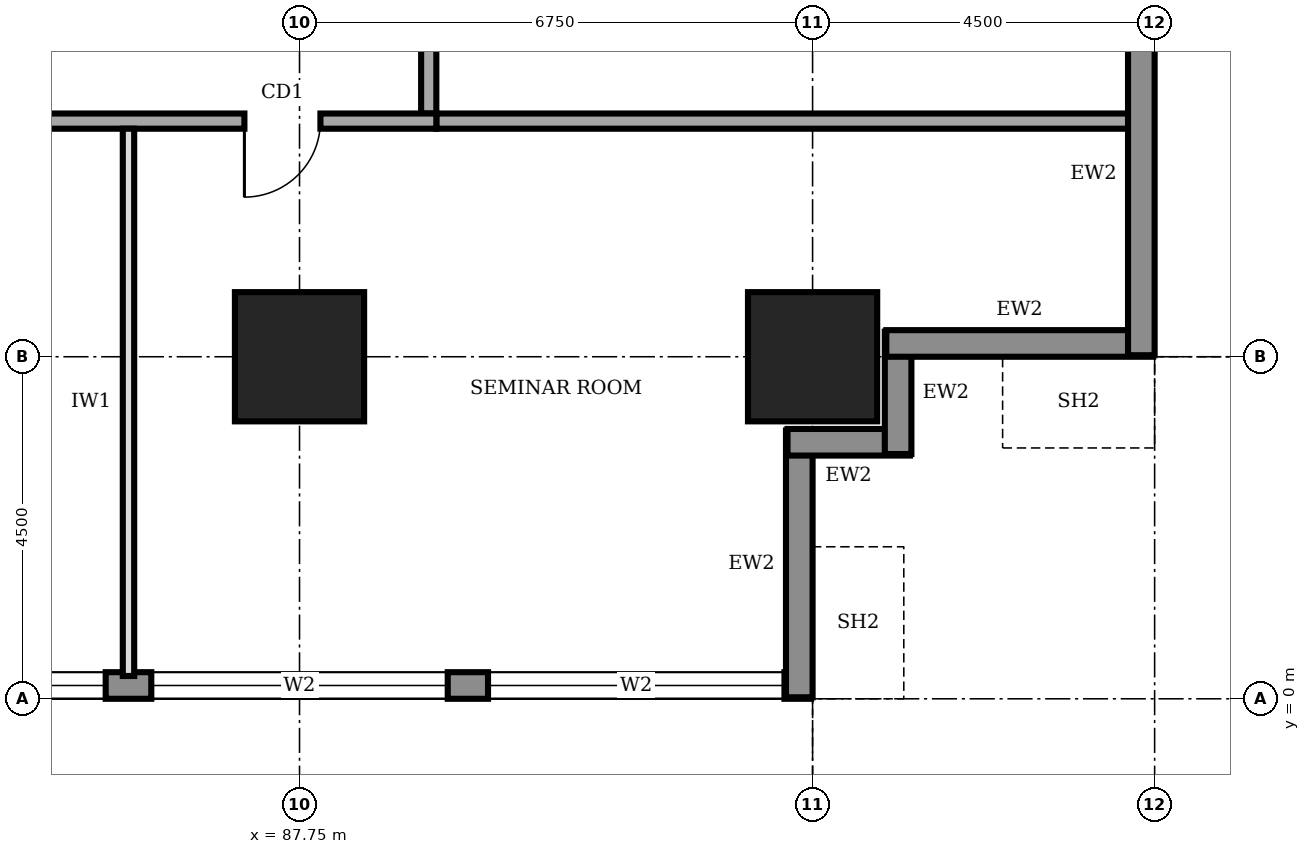
"""IFC4 building model, lengths in metres.
Left out: names, types, materials, properties, quantities, classifications, styles, units other than length and angle.
Written with IfcOpenShell. Run it as: python <this file> out.ifc"""

import sys

from ifc_helpers import new_model, si_unit, direction, frame, frame_2d, origin, origin_2d, place, context, subcontext, project, spatial, rectangle, extrude, element, fill, save


model = new_model("IFC4")
c1 = context("Model", 3, precision=1e-05, world=origin(), true_north=direction((0.0, 1.0)))
c2 = subcontext(c1, "Body", "Model", "MODEL_VIEW")
j1 = project(units=[si_unit("LENGTHUNIT", "METRE"), si_unit("PLANEANGLEUNIT", "RADIAN")], contexts=[c1])
p1 = place(None, origin())
s1 = spatial("IfcSite", under=j1, at=p1, CompositionType="ELEMENT")
p2 = place(p1, origin())
s2 = spatial("IfcBuilding", under=s1, at=p2, CompositionType="ELEMENT")
p3 = place(p2, frame((0.0, 0.0, 61.0)))
s3 = spatial("IfcBuildingStorey", under=s2, at=p3, CompositionType="ELEMENT", Elevation=61.0)
for number, where, z_axis, x_axis in (
    (1, (87.75, 4.5, 0.0), (0.0, 0.0, 1.0), (1.0, 0.0, 0.0)),
    (2, (94.5, 4.5, 0.0), (0.0, 0.0, 1.0), (1.0, 0.0, 0.0)),
):
    element("IfcColumn", number, at=place(p3, frame(where, z_axis=z_axis, x_axis=x_axis)), inside=s3, PredefinedType="COLUMN", context=c2, shape_type="SweptSolid", body=[
        extrude(rectangle(XDim=1.7, YDim=1.7, at=origin_2d()), origin(), (0.0, 0.0, 1.0), 4.0),
    ])
p4 = place(p3, frame((67.52, 0.175, 0.0), z_axis=(0.0, 0.0, 1.0), x_axis=(1.0, 0.0, 0.0)))
e3 = element("IfcWall", 3, at=p4, inside=s3, PredefinedType="STANDARD", context=c2, shape_type="SweptSolid", body=[
    extrude(rectangle(XDim=26.96, YDim=0.35, at=frame_2d((13.48, 0.0))), origin(), (0.0, 0.0, 1.0), 3.75),
])
p5 = place(p4, frame((4.78, 0.0, 0.6)))
e4 = element("IfcOpeningElement", 4, at=p5, cuts=e3, PredefinedType="OPENING", context=c2, shape_type="SweptSolid", body=[
    extrude(rectangle(XDim=3.9, YDim=2.6, at=frame_2d((1.95, 1.3))), frame((0.0, 0.185, 0.0), z_axis=(0.0, -1.0, 0.0), x_axis=(1.0, 0.0, 0.0)), (0.0, 0.0, 1.0), 0.37),
])
p6 = place(p4, frame((9.28, 0.0, 0.6)))
e5 = element("IfcOpeningElement", 5, at=p6, cuts=e3, PredefinedType="OPENING", context=c2, shape_type="SweptSolid", body=[
    extrude(rectangle(XDim=3.9, YDim=2.6, at=frame_2d((1.95, 1.3))), frame((0.0, 0.185, 0.0), z_axis=(0.0, -1.0, 0.0), x_axis=(1.0, 0.0, 0.0)), (0.0, 0.0, 1.0), 0.37),
])
p7 = place(p4, frame((13.78, 0.0, 0.6)))
e6 = element("IfcOpeningElement", 6, at=p7, cuts=e3, PredefinedType="OPENING", context=c2, shape_type="SweptSolid", body=[
    extrude(rectangle(XDim=3.9, YDim=2.6, at=frame_2d((1.95, 1.3))), frame((0.0, 0.185, 0.0), z_axis=(0.0, -1.0, 0.0), x_axis=(1.0, 0.0, 0.0)), (0.0, 0.0, 1.0), 0.37),
])
p8 = place(p4, frame((18.28, 0.0, 0.6)))
e7 = element("IfcOpeningElement", 7, at=p8, cuts=e3, PredefinedType="OPENING", context=c2, shape_type="SweptSolid", body=[
    extrude(rectangle(XDim=3.9, YDim=2.6, at=frame_2d((1.95, 1.3))), frame((0.0, 0.185, 0.0), z_axis=(0.0, -1.0, 0.0), x_axis=(1.0, 0.0, 0.0)), (0.0, 0.0, 1.0), 0.37),
])
p9 = place(p4, frame((22.71, 0.0, 0.6)))
e8 = element("IfcOpeningElement", 8, at=p9, cuts=e3, PredefinedType="OPENING", context=c2, shape_type="SweptSolid", body=[
    extrude(rectangle(XDim=3.9, YDim=2.6, at=frame_2d((1.95, 1.3))), frame((0.0, 0.185, 0.0), z_axis=(0.0, -1.0, 0.0), x_axis=(1.0, 0.0, 0.0)), (0.0, 0.0, 1.0), 0.37),
])
p10 = place(p3, frame((94.325, 0.02, 0.0), z_axis=(0.0, 0.0, 1.0), x_axis=(0.0, 1.0, 0.0)))
e9 = element("IfcWall", 9, at=p10, inside=s3, PredefinedType="STANDARD", context=c2, shape_type="SweptSolid", body=[
    extrude(rectangle(XDim=3.51, YDim=0.35, at=frame_2d((1.755, 0.0))), origin(), (0.0, 0.0, 1.0), 2.85),
])
for number, where, z_axis, x_axis in (
    (10, (94.17, 3.375, 0.0), (0.0, 0.0, 1.0), (1.0, 0.0, 0.0)),
    (11, (95.625, 3.22, 0.0), (0.0, 0.0, 1.0), (0.0, 1.0, 0.0)),
):
    element("IfcWall", number, at=place(p3, frame(where, z_axis=z_axis, x_axis=x_axis)), inside=s3, PredefinedType="STANDARD", context=c2, shape_type="SweptSolid", body=[
        extrude(rectangle(XDim=1.61, YDim=0.35, at=frame_2d((0.805, 0.0))), origin(), (0.0, 0.0, 1.0), 3.75),
    ])
p11 = place(p3, frame((95.47, 4.675, 0.0), z_axis=(0.0, 0.0, 1.0), x_axis=(1.0, 0.0, 0.0)))
e12 = element("IfcWall", 12, at=p11, inside=s3, PredefinedType="STANDARD", context=c2, shape_type="SweptSolid", body=[
    extrude(rectangle(XDim=3.51, YDim=0.35, at=frame_2d((1.755, 0.0))), origin(), (0.0, 0.0, 1.0), 2.85),
])
p12 = place(p3, frame((98.825, 4.52, 0.0), z_axis=(0.0, 0.0, 1.0), x_axis=(0.0, 1.0, 0.0)))
e13 = element("IfcWall", 13, at=p12, inside=s3, PredefinedType="STANDARD", context=c2, shape_type="SweptSolid", body=[
    extrude(rectangle(XDim=31.46, YDim=0.35, at=frame_2d((15.73, 0.0))), origin(), (0.0, 0.0, 1.0), 3.75),
])
p13 = place(p12, frame((4.78, 0.0, 0.6)))
e14 = element("IfcOpeningElement", 14, at=p13, cuts=e13, PredefinedType="OPENING", context=c2, shape_type="SweptSolid", body=[
    extrude(rectangle(XDim=3.9, YDim=2.6, at=frame_2d((1.95, 1.3))), frame((0.0, 0.185, 0.0), z_axis=(0.0, -1.0, 0.0), x_axis=(1.0, 0.0, 0.0)), (0.0, 0.0, 1.0), 0.37),
])
p14 = place(p12, frame((9.28, 0.0, 0.6)))
e15 = element("IfcOpeningElement", 15, at=p14, cuts=e13, PredefinedType="OPENING", context=c2, shape_type="SweptSolid", body=[
    extrude(rectangle(XDim=3.9, YDim=2.6, at=frame_2d((1.95, 1.3))), frame((0.0, 0.185, 0.0), z_axis=(0.0, -1.0, 0.0), x_axis=(1.0, 0.0, 0.0)), (0.0, 0.0, 1.0), 0.37),
])
p15 = place(p12, frame((13.78, 0.0, 0.6)))
e16 = element("IfcOpeningElement", 16, at=p15, cuts=e13, PredefinedType="OPENING", context=c2, shape_type="SweptSolid", body=[
    extrude(rectangle(XDim=3.9, YDim=2.6, at=frame_2d((1.95, 1.3))), frame((0.0, 0.185, 0.0), z_axis=(0.0, -1.0, 0.0), x_axis=(1.0, 0.0, 0.0)), (0.0, 0.0, 1.0), 0.37),
])
p16 = place(p12, frame((18.28, 0.0, 0.6)))
e17 = element("IfcOpeningElement", 17, at=p16, cuts=e13, PredefinedType="OPENING", context=c2, shape_type="SweptSolid", body=[
    extrude(rectangle(XDim=3.9, YDim=2.6, at=frame_2d((1.95, 1.3))), frame((0.0, 0.185, 0.0), z_axis=(0.0, -1.0, 0.0), x_axis=(1.0, 0.0, 0.0)), (0.0, 0.0, 1.0), 0.37),
])
p17 = place(p12, frame((22.78, 0.0, 0.6)))
e18 = element("IfcOpeningElement", 18, at=p17, cuts=e13, PredefinedType="OPENING", context=c2, shape_type="SweptSolid", body=[
    extrude(rectangle(XDim=3.9, YDim=2.6, at=frame_2d((1.95, 1.3))), frame((0.0, 0.185, 0.0), z_axis=(0.0, -1.0, 0.0), x_axis=(1.0, 0.0, 0.0)), (0.0, 0.0, 1.0), 0.37),
])
p18 = place(p12, frame((27.21, 0.0, 0.6)))
e19 = element("IfcOpeningElement", 19, at=p18, cuts=e13, PredefinedType="OPENING", context=c2, shape_type="SweptSolid", body=[
    extrude(rectangle(XDim=3.9, YDim=2.6, at=frame_2d((1.95, 1.3))), frame((0.0, 0.185, 0.0), z_axis=(0.0, -1.0, 0.0), x_axis=(1.0, 0.0, 0.0)), (0.0, 0.0, 1.0), 0.37),
])
p19 = place(p3, frame((72.65, 7.6, 0.0), z_axis=(0.0, 0.0, 1.0), x_axis=(1.0, 0.0, 0.0)))
e20 = element("IfcWall", 20, at=p19, inside=s3, PredefinedType="SOLIDWALL", context=c2, shape_type="SweptSolid", body=[
    extrude(rectangle(XDim=16.9, YDim=0.2, at=frame_2d((8.45, 0.0))), origin(), (0.0, 0.0, 1.0), 3.75),
])
p20 = place(p19, frame((3.175, 0.0, 0.0)))
e21 = element("IfcOpeningElement", 21, at=p20, cuts=e20, PredefinedType="OPENING", context=c2, shape_type="SweptSolid", body=[
    extrude(rectangle(XDim=1.8, YDim=2.1, at=frame_2d((0.9, 1.05))), frame((0.0, 0.11, 0.0), z_axis=(0.0, -1.0, 0.0), x_axis=(1.0, 0.0, 0.0)), (0.0, 0.0, 1.0), 0.22),
])
p21 = place(p19, frame((10.1, 0.0, 0.0)))
e22 = element("IfcOpeningElement", 22, at=p21, cuts=e20, PredefinedType="OPENING", context=c2, shape_type="SweptSolid", body=[
    extrude(rectangle(XDim=1.0, YDim=2.1, at=frame_2d((0.5, 1.05))), frame((0.0, 0.11, 0.0), z_axis=(0.0, -1.0, 0.0), x_axis=(1.0, 0.0, 0.0)), (0.0, 0.0, 1.0), 0.22),
])
p22 = place(p19, frame((14.375, 0.0, 0.0)))
e23 = element("IfcOpeningElement", 23, at=p22, cuts=e20, PredefinedType="OPENING", context=c2, shape_type="SweptSolid", body=[
    extrude(rectangle(XDim=1.0, YDim=2.1, at=frame_2d((0.5, 1.05))), frame((0.0, 0.11, 0.0), z_axis=(0.0, -1.0, 0.0), x_axis=(1.0, 0.0, 0.0)), (0.0, 0.0, 1.0), 0.22),
])
p23 = place(p3, frame((89.45, 7.7, 0.0), z_axis=(0.0, 0.0, 1.0), x_axis=(0.0, 1.0, 0.0)))
e24 = element("IfcWall", 24, at=p23, inside=s3, PredefinedType="SOLIDWALL", context=c2, shape_type="SweptSolid", body=[
    extrude(rectangle(XDim=25.3, YDim=0.2, at=frame_2d((12.65, 0.0))), origin(), (0.0, 0.0, 1.0), 3.75),
])
p24 = place(p23, frame((2.3, 0.0, 0.0)))
e25 = element("IfcOpeningElement", 25, at=p24, cuts=e24, PredefinedType="OPENING", context=c2, shape_type="SweptSolid", body=[
    extrude(rectangle(XDim=1.0, YDim=2.1, at=frame_2d((0.5, 1.05))), frame((0.0, 0.11, 0.0), z_axis=(0.0, -1.0, 0.0), x_axis=(1.0, 0.0, 0.0)), (0.0, 0.0, 1.0), 0.22),
])
p25 = place(p23, frame((7.25, 0.0, 0.0)))
e26 = element("IfcOpeningElement", 26, at=p25, cuts=e24, PredefinedType="OPENING", context=c2, shape_type="SweptSolid", body=[
    extrude(rectangle(XDim=0.9, YDim=2.1, at=frame_2d((0.45, 1.05))), frame((0.0, 0.11, 0.0), z_axis=(0.0, -1.0, 0.0), x_axis=(1.0, 0.0, 0.0)), (0.0, 0.0, 1.0), 0.22),
])
p26 = place(p23, frame((10.25, 0.0, 0.0)))
e27 = element("IfcOpeningElement", 27, at=p26, cuts=e24, PredefinedType="OPENING", context=c2, shape_type="SweptSolid", body=[
    extrude(rectangle(XDim=0.9, YDim=2.1, at=frame_2d((0.45, 1.05))), frame((0.0, 0.11, 0.0), z_axis=(0.0, -1.0, 0.0), x_axis=(1.0, 0.0, 0.0)), (0.0, 0.0, 1.0), 0.22),
])
p27 = place(p23, frame((15.1, 0.0, 0.0)))
e28 = element("IfcOpeningElement", 28, at=p27, cuts=e24, PredefinedType="OPENING", context=c2, shape_type="SweptSolid", body=[
    extrude(rectangle(XDim=0.9, YDim=2.1, at=frame_2d((0.45, 1.05))), frame((0.0, 0.11, 0.0), z_axis=(0.0, -1.0, 0.0), x_axis=(1.0, 0.0, 0.0)), (0.0, 0.0, 1.0), 0.22),
])
p28 = place(p23, frame((17.8, 0.0, 0.0)))
e29 = element("IfcOpeningElement", 29, at=p28, cuts=e24, PredefinedType="OPENING", context=c2, shape_type="SweptSolid", body=[
    extrude(rectangle(XDim=1.0, YDim=2.1, at=frame_2d((0.5, 1.05))), frame((0.0, 0.11, 0.0), z_axis=(0.0, -1.0, 0.0), x_axis=(1.0, 0.0, 0.0)), (0.0, 0.0, 1.0), 0.22),
])
p29 = place(p23, frame((12.3, 0.0, 0.0)))
e30 = element("IfcOpeningElement", 30, at=p29, cuts=e24, PredefinedType="OPENING", context=c2, shape_type="SweptSolid", body=[
    extrude(rectangle(XDim=1.0, YDim=2.1, at=frame_2d((0.5, 1.05))), frame((0.0, 0.11, 0.0), z_axis=(0.0, -1.0, 0.0), x_axis=(1.0, 0.0, 0.0)), (0.0, 0.0, 1.0), 0.22),
])
p30 = place(p23, frame((21.8, 0.0, 0.0)))
e31 = element("IfcOpeningElement", 31, at=p30, cuts=e24, PredefinedType="OPENING", context=c2, shape_type="SweptSolid", body=[
    extrude(rectangle(XDim=1.0, YDim=2.1, at=frame_2d((0.5, 1.05))), frame((0.0, 0.11, 0.0), z_axis=(0.0, -1.0, 0.0), x_axis=(1.0, 0.0, 0.0)), (0.0, 0.0, 1.0), 0.22),
])
p31 = place(p3, frame((89.55, 7.6, 0.0), z_axis=(0.0, 0.0, 1.0), x_axis=(1.0, 0.0, 0.0)))
e32 = element("IfcWall", 32, at=p31, inside=s3, PredefinedType="SOLIDWALL", context=c2, shape_type="SweptSolid", body=[
    extrude(rectangle(XDim=9.15, YDim=0.2, at=frame_2d((4.575, 0.0))), origin(), (0.0, 0.0, 1.0), 3.75),
])
p32 = place(p3, frame((85.5, 0.3, 0.0), z_axis=(0.0, 0.0, 1.0), x_axis=(0.0, 1.0, 0.0)))
e33 = element("IfcWall", 33, at=p32, inside=s3, PredefinedType="PARTITIONING", context=c2, shape_type="SweptSolid", body=[
    extrude(rectangle(XDim=7.2, YDim=0.15, at=frame_2d((3.6, 0.0))), origin(), (0.0, 0.0, 1.0), 3.75),
])
p33 = place(p7, origin())
e34 = element("IfcWindow", 34, at=p33, inside=s3, PartitioningType="SINGLE_PANEL", PredefinedType="WINDOW", context=c2, shape_type="SweptSolid", body=[
    extrude(rectangle(XDim=3.9, YDim=2.6, at=frame_2d((1.95, 1.3))), frame((0.0, 0.03, 0.0), z_axis=(0.0, -1.0, 0.0), x_axis=(1.0, 0.0, 0.0)), (0.0, 0.0, 1.0), 0.06),
])
fill(e6, e34)
p34 = place(p8, origin())
e35 = element("IfcWindow", 35, at=p34, inside=s3, PartitioningType="SINGLE_PANEL", PredefinedType="WINDOW", context=c2, shape_type="SweptSolid", body=[
    extrude(rectangle(XDim=3.9, YDim=2.6, at=frame_2d((1.95, 1.3))), frame((0.0, 0.03, 0.0), z_axis=(0.0, -1.0, 0.0), x_axis=(1.0, 0.0, 0.0)), (0.0, 0.0, 1.0), 0.06),
])
fill(e7, e35)
p35 = place(p9, origin())
e36 = element("IfcWindow", 36, at=p35, inside=s3, PartitioningType="SINGLE_PANEL", PredefinedType="WINDOW", context=c2, shape_type="SweptSolid", body=[
    extrude(rectangle(XDim=3.9, YDim=2.6, at=frame_2d((1.95, 1.3))), frame((0.0, 0.03, 0.0), z_axis=(0.0, -1.0, 0.0), x_axis=(1.0, 0.0, 0.0)), (0.0, 0.0, 1.0), 0.06),
])
fill(e8, e36)
p36 = place(p22, frame((1.0, 0.0, 0.0), z_axis=(0.0, 0.0, 1.0), x_axis=(-1.0, 0.0, 0.0)))
e37 = element("IfcDoor", 37, at=p36, inside=s3, OperationType="SINGLE_SWING_RIGHT", PredefinedType="DOOR", context=c2, shape_type="SweptSolid", body=[
    extrude(rectangle(XDim=1.0, YDim=2.1, at=frame_2d((0.5, 1.05))), frame((0.0, 0.025, 0.0), z_axis=(0.0, -1.0, 0.0), x_axis=(1.0, 0.0, 0.0)), (0.0, 0.0, 1.0), 0.05),
])
fill(e23, e37)
save(model, sys.argv[1])
